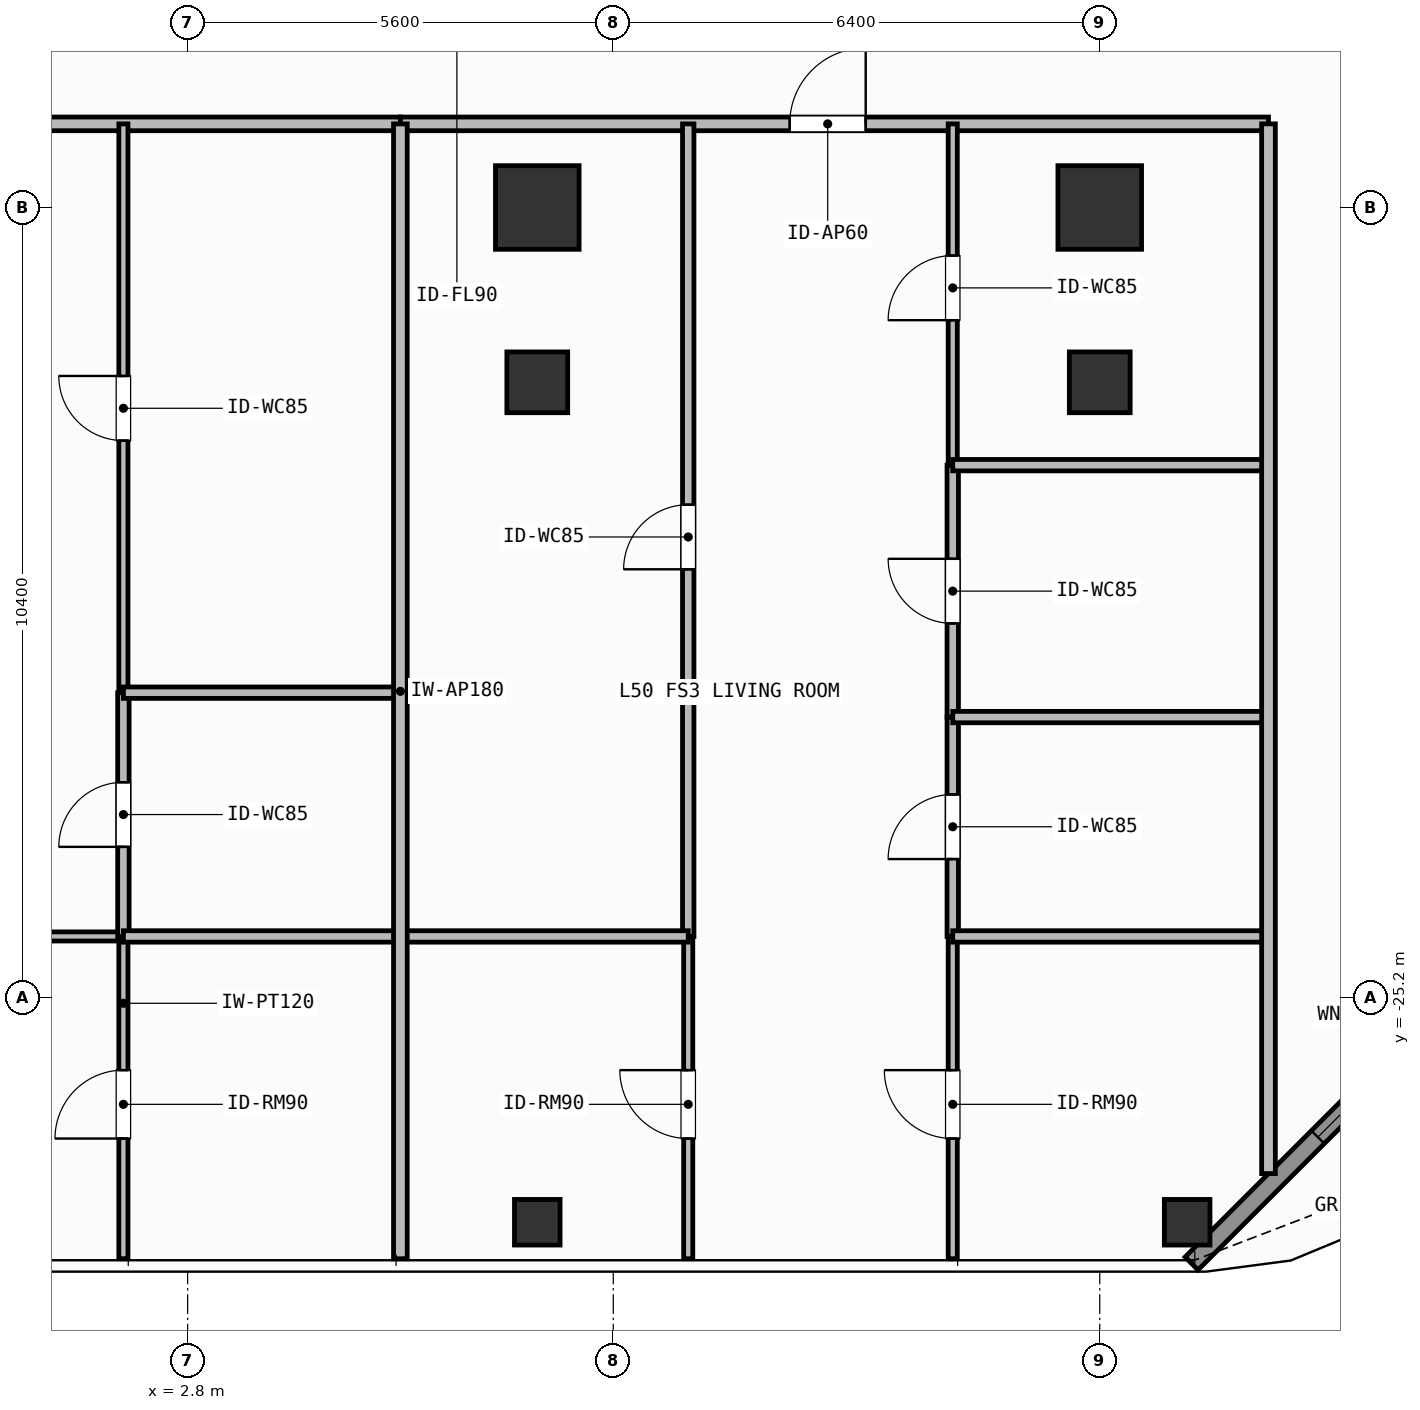
"""IFC4 building model, lengths in metres.
Left out: names, types, materials, properties, quantities, classifications, styles, units other than length and angle.
Written with IfcOpenShell. Run it as: python <this file> out.ifc"""

import sys

from ifc_helpers import new_model, si_unit, direction, frame, frame_2d, origin, origin_2d, place, context, subcontext, project, spatial, rectangle, hollow_rectangle, extrude, element, fill, save


model = new_model("IFC4")
c1 = context("Model", 3, precision=1e-05, world=origin(), true_north=direction((0.0, 1.0)))
c2 = subcontext(c1, "Body", "Model", "MODEL_VIEW")
j1 = project(units=[si_unit("LENGTHUNIT", "METRE"), si_unit("PLANEANGLEUNIT", "RADIAN")], contexts=[c1])
p1 = place(None, origin())
s1 = spatial("IfcSite", under=j1, at=p1, CompositionType="ELEMENT")
p2 = place(p1, origin())
s2 = spatial("IfcBuilding", under=s1, at=p2, CompositionType="ELEMENT")
p3 = place(p2, frame((0.0, 0.0, 203.1)))
s3 = spatial("IfcBuildingStorey", under=s2, at=p3, CompositionType="ELEMENT", Elevation=203.1)
for number, where, z_axis, x_axis in (
    (1, (7.4, -14.8, 0.0), (0.0, 0.0, 1.0), (1.0, 0.0, 0.0)),
    (2, (14.8, -14.8, 0.0), (0.0, 0.0, 1.0), (1.0, 0.0, 0.0)),
):
    element("IfcColumn", number, at=place(p3, frame(where, z_axis=z_axis, x_axis=x_axis)), inside=s3, PredefinedType="COLUMN", context=c2, shape_type="SweptSolid", body=[
        extrude(rectangle(XDim=1.1, YDim=1.1, at=origin_2d()), origin(), (0.0, 0.0, 1.0), 3.9),
    ])
for number, where, z_axis, x_axis in (
    (3, (7.4, -17.1, 0.0), (0.0, 0.0, 1.0), (1.0, 0.0, 0.0)),
    (4, (14.8, -17.1, 0.0), (0.0, 0.0, 1.0), (1.0, 0.0, 0.0)),
):
    element("IfcColumn", number, at=place(p3, frame(where, z_axis=z_axis, x_axis=x_axis)), inside=s3, PredefinedType="COLUMN", context=c2, shape_type="SweptSolid", body=[
        extrude(hollow_rectangle(XDim=0.8, YDim=0.8, WallThickness=0.036, at=origin_2d()), origin(), (0.0, 0.0, 1.0), 3.9),
    ])
for number, where, z_axis, x_axis in (
    (5, (15.95, -28.15, 0.0), (0.0, 0.0, 1.0), (1.0, 0.0, 0.0)),
    (6, (7.4, -28.15, 0.0), (0.0, 0.0, 1.0), (1.0, 0.0, 0.0)),
):
    element("IfcColumn", number, at=place(p3, frame(where, z_axis=z_axis, x_axis=x_axis)), inside=s3, PredefinedType="COLUMN", context=c2, shape_type="SweptSolid", body=[
        extrude(hollow_rectangle(XDim=0.6, YDim=0.6, WallThickness=0.028, at=origin_2d()), origin(), (0.0, 0.0, 1.0), 3.9),
    ])
p4 = place(p3, frame((20.392, -24.308, 0.0), z_axis=(0.0, 0.0, 1.0), x_axis=(-0.707106781187, -0.707106781187, 0.0)))
e7 = element("IfcWall", 7, at=p4, inside=s3, PredefinedType="SOLIDWALL", context=c2, shape_type="SweptSolid", body=[
    extrude(rectangle(XDim=6.201, YDim=0.24, at=frame_2d((3.101, 0.0))), origin(), (0.0, 0.0, 1.0), 3.68),
])
p5 = place(p4, frame((2.351, 0.0, 0.8)))
e8 = element("IfcOpeningElement", 8, at=p5, cuts=e7, PredefinedType="OPENING", context=c2, shape_type="SweptSolid", body=[
    extrude(rectangle(XDim=1.5, YDim=1.85, at=frame_2d((0.75, 0.925))), frame((0.0, 0.13, 0.0), z_axis=(0.0, -1.0, 0.0), x_axis=(1.0, 0.0, 0.0)), (0.0, 0.0, 1.0), 0.26),
])
p6 = place(p3, frame((-10.855, -13.7, 0.0), z_axis=(0.0, 0.0, 1.0), x_axis=(1.0, 0.0, 0.0)))
e9 = element("IfcWall", 9, at=p6, inside=s3, PredefinedType="PARTITIONING", context=c2, shape_type="SweptSolid", body=[
    extrude(rectangle(XDim=16.454, YDim=0.18, at=frame_2d((8.227, 0.0))), origin(), (0.0, 0.0, 1.0), 3.68),
])
p7 = place(p6, frame((8.528, 0.0, 0.0)))
e10 = element("IfcOpeningElement", 10, at=p7, cuts=e9, PredefinedType="OPENING", context=c2, shape_type="SweptSolid", body=[
    extrude(rectangle(XDim=1.0, YDim=2.2, at=frame_2d((0.5, 1.1))), frame((0.0, 0.1, 0.0), z_axis=(0.0, -1.0, 0.0), x_axis=(1.0, 0.0, 0.0)), (0.0, 0.0, 1.0), 0.2),
])
p8 = place(p3, frame((-5.293, -24.39, 0.0), z_axis=(0.0, 0.0, 1.0), x_axis=(1.0, 0.0, 0.0)))
e11 = element("IfcWall", 11, at=p8, inside=s3, PredefinedType="PARTITIONING", context=c2, shape_type="SweptSolid", body=[
    extrude(rectangle(XDim=7.248, YDim=0.12, at=frame_2d((3.624, 0.0))), origin(), (0.0, 0.0, 1.0), 3.68),
])
p9 = place(p8, frame((3.174, 0.0, 0.0)))
e12 = element("IfcOpeningElement", 12, at=p9, cuts=e11, PredefinedType="OPENING", context=c2, shape_type="SweptSolid", body=[
    extrude(rectangle(XDim=0.9, YDim=2.1, at=frame_2d((0.45, 1.05))), frame((0.0, 0.07, 0.0), z_axis=(0.0, -1.0, 0.0), x_axis=(1.0, 0.0, 0.0)), (0.0, 0.0, 1.0), 0.14),
])
p10 = place(p3, frame((1.955, -24.39, 0.0), z_axis=(0.0, 0.0, 1.0), x_axis=(0.0, 1.0, 0.0)))
e13 = element("IfcWall", 13, at=p10, inside=s3, PredefinedType="PARTITIONING", context=c2, shape_type="SweptSolid", body=[
    extrude(rectangle(XDim=3.207, YDim=0.15, at=frame_2d((1.604, 0.0))), origin(), (0.0, 0.0, 1.0), 3.68),
])
p11 = place(p10, frame((1.178, 0.0, 0.0)))
e14 = element("IfcOpeningElement", 14, at=p11, cuts=e13, PredefinedType="OPENING", context=c2, shape_type="SweptSolid", body=[
    extrude(rectangle(XDim=0.85, YDim=2.1, at=frame_2d((0.425, 1.05))), frame((0.0, 0.085, 0.0), z_axis=(0.0, -1.0, 0.0), x_axis=(1.0, 0.0, 0.0)), (0.0, 0.0, 1.0), 0.17),
])
p12 = place(p3, frame((1.955, -21.183, 0.0), z_axis=(0.0, 0.0, 1.0), x_axis=(0.0, 1.0, 0.0)))
e15 = element("IfcWall", 15, at=p12, inside=s3, PredefinedType="PARTITIONING", context=c2, shape_type="SweptSolid", body=[
    extrude(rectangle(XDim=7.483, YDim=0.12, at=frame_2d((3.742, 0.0))), origin(), (0.0, 0.0, 1.0), 3.68),
])
p13 = place(p12, frame((3.316, 0.0, 0.0)))
e16 = element("IfcOpeningElement", 16, at=p13, cuts=e15, PredefinedType="OPENING", context=c2, shape_type="SweptSolid", body=[
    extrude(rectangle(XDim=0.85, YDim=2.1, at=frame_2d((0.425, 1.05))), frame((0.0, 0.07, 0.0), z_axis=(0.0, -1.0, 0.0), x_axis=(1.0, 0.0, 0.0)), (0.0, 0.0, 1.0), 0.14),
])
p14 = place(p3, frame((1.955, -28.63, 0.0), z_axis=(0.0, 0.0, 1.0), x_axis=(0.0, 1.0, 0.0)))
e17 = element("IfcWall", 17, at=p14, inside=s3, PredefinedType="PARTITIONING", context=c2, shape_type="SweptSolid", body=[
    extrude(rectangle(XDim=4.24, YDim=0.12, at=frame_2d((2.12, 0.0))), origin(), (0.0, 0.0, 1.0), 3.68),
])
p15 = place(p14, frame((1.581, 0.0, 0.0)))
e18 = element("IfcOpeningElement", 18, at=p15, cuts=e17, PredefinedType="OPENING", context=c2, shape_type="SweptSolid", body=[
    extrude(rectangle(XDim=0.9, YDim=2.1, at=frame_2d((0.45, 1.05))), frame((0.0, 0.07, 0.0), z_axis=(0.0, -1.0, 0.0), x_axis=(1.0, 0.0, 0.0)), (0.0, 0.0, 1.0), 0.14),
])
p16 = place(p3, frame((5.599, -13.7, 0.0), z_axis=(0.0, 0.0, 1.0), x_axis=(1.0, 0.0, 0.0)))
e19 = element("IfcWall", 19, at=p16, inside=s3, PredefinedType="PARTITIONING", context=c2, shape_type="SweptSolid", body=[
    extrude(rectangle(XDim=11.421, YDim=0.18, at=frame_2d((5.71, 0.0))), origin(), (0.0, 0.0, 1.0), 3.68),
])
p17 = place(p16, frame((5.122, 0.0, 0.0)))
e20 = element("IfcOpeningElement", 20, at=p17, cuts=e19, PredefinedType="OPENING", context=c2, shape_type="SweptSolid", body=[
    extrude(rectangle(XDim=1.0, YDim=2.2, at=frame_2d((0.5, 1.1))), frame((0.0, 0.1, 0.0), z_axis=(0.0, -1.0, 0.0), x_axis=(1.0, 0.0, 0.0)), (0.0, 0.0, 1.0), 0.2),
])
p18 = place(p3, frame((9.386, -24.39, 0.0), z_axis=(0.0, 0.0, 1.0), x_axis=(0.0, 1.0, 0.0)))
e21 = element("IfcWall", 21, at=p18, inside=s3, PredefinedType="PARTITIONING", context=c2, shape_type="SweptSolid", body=[
    extrude(rectangle(XDim=10.69, YDim=0.15, at=frame_2d((5.345, 0.0))), origin(), (0.0, 0.0, 1.0), 3.68),
])
p19 = place(p18, frame((4.83, 0.0, 0.0)))
e22 = element("IfcOpeningElement", 22, at=p19, cuts=e21, PredefinedType="OPENING", context=c2, shape_type="SweptSolid", body=[
    extrude(rectangle(XDim=0.85, YDim=2.1, at=frame_2d((0.425, 1.05))), frame((0.0, 0.085, 0.0), z_axis=(0.0, -1.0, 0.0), x_axis=(1.0, 0.0, 0.0)), (0.0, 0.0, 1.0), 0.17),
])
p20 = place(p3, frame((9.386, -28.63, 0.0), z_axis=(0.0, 0.0, 1.0), x_axis=(0.0, 1.0, 0.0)))
e23 = element("IfcWall", 23, at=p20, inside=s3, PredefinedType="PARTITIONING", context=c2, shape_type="SweptSolid", body=[
    extrude(rectangle(XDim=4.24, YDim=0.12, at=frame_2d((2.12, 0.0))), origin(), (0.0, 0.0, 1.0), 3.68),
])
p21 = place(p20, frame((1.581, 0.0, 0.0)))
e24 = element("IfcOpeningElement", 24, at=p21, cuts=e23, PredefinedType="OPENING", context=c2, shape_type="SweptSolid", body=[
    extrude(rectangle(XDim=0.9, YDim=2.1, at=frame_2d((0.45, 1.05))), frame((0.0, 0.07, 0.0), z_axis=(0.0, -1.0, 0.0), x_axis=(1.0, 0.0, 0.0)), (0.0, 0.0, 1.0), 0.14),
])
p22 = place(p3, frame((12.866, -24.39, 0.0), z_axis=(0.0, 0.0, 1.0), x_axis=(0.0, 1.0, 0.0)))
e25 = element("IfcWall", 25, at=p22, inside=s3, PredefinedType="PARTITIONING", context=c2, shape_type="SweptSolid", body=[
    extrude(rectangle(XDim=2.886, YDim=0.15, at=frame_2d((1.443, 0.0))), origin(), (0.0, 0.0, 1.0), 3.68),
])
p23 = place(p22, frame((1.018, 0.0, 0.0)))
e26 = element("IfcOpeningElement", 26, at=p23, cuts=e25, PredefinedType="OPENING", context=c2, shape_type="SweptSolid", body=[
    extrude(rectangle(XDim=0.85, YDim=2.1, at=frame_2d((0.425, 1.05))), frame((0.0, 0.085, 0.0), z_axis=(0.0, -1.0, 0.0), x_axis=(1.0, 0.0, 0.0)), (0.0, 0.0, 1.0), 0.17),
])
p24 = place(p3, frame((12.866, -21.504, 0.0), z_axis=(0.0, 0.0, 1.0), x_axis=(0.0, 1.0, 0.0)))
e27 = element("IfcWall", 27, at=p24, inside=s3, PredefinedType="PARTITIONING", context=c2, shape_type="SweptSolid", body=[
    extrude(rectangle(XDim=3.314, YDim=0.15, at=frame_2d((1.657, 0.0))), origin(), (0.0, 0.0, 1.0), 3.68),
])
p25 = place(p24, frame((1.232, 0.0, 0.0)))
e28 = element("IfcOpeningElement", 28, at=p25, cuts=e27, PredefinedType="OPENING", context=c2, shape_type="SweptSolid", body=[
    extrude(rectangle(XDim=0.85, YDim=2.1, at=frame_2d((0.425, 1.05))), frame((0.0, 0.085, 0.0), z_axis=(0.0, -1.0, 0.0), x_axis=(1.0, 0.0, 0.0)), (0.0, 0.0, 1.0), 0.17),
])
p26 = place(p3, frame((12.866, -18.19, 0.0), z_axis=(0.0, 0.0, 1.0), x_axis=(0.0, 1.0, 0.0)))
e29 = element("IfcWall", 29, at=p26, inside=s3, PredefinedType="PARTITIONING", context=c2, shape_type="SweptSolid", body=[
    extrude(rectangle(XDim=4.49, YDim=0.12, at=frame_2d((2.245, 0.0))), origin(), (0.0, 0.0, 1.0), 3.68),
])
p27 = place(p26, frame((1.907, 0.0, 0.0)))
e30 = element("IfcOpeningElement", 30, at=p27, cuts=e29, PredefinedType="OPENING", context=c2, shape_type="SweptSolid", body=[
    extrude(rectangle(XDim=0.85, YDim=2.1, at=frame_2d((0.425, 1.05))), frame((0.0, 0.07, 0.0), z_axis=(0.0, -1.0, 0.0), x_axis=(1.0, 0.0, 0.0)), (0.0, 0.0, 1.0), 0.14),
])
p28 = place(p3, frame((12.866, -28.63, 0.0), z_axis=(0.0, 0.0, 1.0), x_axis=(0.0, 1.0, 0.0)))
e31 = element("IfcWall", 31, at=p28, inside=s3, PredefinedType="PARTITIONING", context=c2, shape_type="SweptSolid", body=[
    extrude(rectangle(XDim=4.24, YDim=0.12, at=frame_2d((2.12, 0.0))), origin(), (0.0, 0.0, 1.0), 3.68),
])
p29 = place(p28, frame((1.581, 0.0, 0.0)))
e32 = element("IfcOpeningElement", 32, at=p29, cuts=e31, PredefinedType="OPENING", context=c2, shape_type="SweptSolid", body=[
    extrude(rectangle(XDim=0.9, YDim=2.1, at=frame_2d((0.45, 1.05))), frame((0.0, 0.07, 0.0), z_axis=(0.0, -1.0, 0.0), x_axis=(1.0, 0.0, 0.0)), (0.0, 0.0, 1.0), 0.14),
])
for number, where, z_axis, x_axis in (
    (33, (1.955, -21.183, 0.0), (0.0, 0.0, 1.0), (1.0, 0.0, 0.0)),
    (34, (1.955, -24.39, 0.0), (0.0, 0.0, 1.0), (1.0, 0.0, 0.0)),
):
    element("IfcWall", number, at=place(p3, frame(where, z_axis=z_axis, x_axis=x_axis)), inside=s3, PredefinedType="PARTITIONING", context=c2, shape_type="SweptSolid", body=[
        extrude(rectangle(XDim=3.644, YDim=0.15, at=frame_2d((1.822, 0.0))), origin(), (0.0, 0.0, 1.0), 3.68),
    ])
p30 = place(p3, frame((5.599, -24.39, 0.0), z_axis=(0.0, 0.0, 1.0), x_axis=(1.0, 0.0, 0.0)))
e35 = element("IfcWall", 35, at=p30, inside=s3, PredefinedType="PARTITIONING", context=c2, shape_type="SweptSolid", body=[
    extrude(rectangle(XDim=3.787, YDim=0.15, at=frame_2d((1.894, 0.0))), origin(), (0.0, 0.0, 1.0), 3.68),
])
p31 = place(p3, frame((12.866, -21.504, 0.0), z_axis=(0.0, 0.0, 1.0), x_axis=(1.0, 0.0, 0.0)))
e36 = element("IfcWall", 36, at=p31, inside=s3, PredefinedType="PARTITIONING", context=c2, shape_type="SweptSolid", body=[
    extrude(rectangle(XDim=4.154, YDim=0.15, at=frame_2d((2.077, 0.0))), origin(), (0.0, 0.0, 1.0), 3.42),
])
for number, where, z_axis, x_axis in (
    (37, (12.866, -18.19, 0.0), (0.0, 0.0, 1.0), (1.0, 0.0, 0.0)),
    (38, (12.866, -24.39, 0.0), (0.0, 0.0, 1.0), (1.0, 0.0, 0.0)),
):
    element("IfcWall", number, at=place(p3, frame(where, z_axis=z_axis, x_axis=x_axis)), inside=s3, PredefinedType="PARTITIONING", context=c2, shape_type="SweptSolid", body=[
        extrude(rectangle(XDim=4.154, YDim=0.15, at=frame_2d((2.077, 0.0))), origin(), (0.0, 0.0, 1.0), 3.68),
    ])
p32 = place(p3, frame((5.599, -28.63, 0.0), z_axis=(0.0, 0.0, 1.0), x_axis=(0.0, 1.0, 0.0)))
e39 = element("IfcWall", 39, at=p32, inside=s3, PredefinedType="PARTITIONING", context=c2, shape_type="SweptSolid", body=[
    extrude(rectangle(XDim=14.93, YDim=0.18, at=frame_2d((7.465, 0.0))), origin(), (0.0, 0.0, 1.0), 3.68),
])
p33 = place(p3, frame((17.02, -27.51, 0.0), z_axis=(0.0, 0.0, 1.0), x_axis=(0.0, 1.0, 0.0)))
e40 = element("IfcWall", 40, at=p33, inside=s3, PredefinedType="PARTITIONING", context=c2, shape_type="SweptSolid", body=[
    extrude(rectangle(XDim=13.81, YDim=0.18, at=frame_2d((6.905, 0.0))), origin(), (0.0, 0.0, 1.0), 3.68),
])
p34 = place(p5, origin())
e41 = element("IfcWindow", 41, at=p34, inside=s3, PartitioningType="SINGLE_PANEL", PredefinedType="WINDOW", context=c2, shape_type="SweptSolid", body=[
    extrude(rectangle(XDim=1.5, YDim=1.85, at=frame_2d((0.75, 0.925))), frame((0.0, 0.03, 0.0), z_axis=(0.0, -1.0, 0.0), x_axis=(1.0, 0.0, 0.0)), (0.0, 0.0, 1.0), 0.06),
])
fill(e8, e41)
p35 = place(p11, origin())
e42 = element("IfcDoor", 42, at=p35, inside=s3, OperationType="SINGLE_SWING_LEFT", PredefinedType="DOOR", context=c2, shape_type="SweptSolid", body=[
    extrude(rectangle(XDim=0.85, YDim=2.1, at=frame_2d((0.425, 1.05))), frame((0.0, 0.025, 0.0), z_axis=(0.0, -1.0, 0.0), x_axis=(1.0, 0.0, 0.0)), (0.0, 0.0, 1.0), 0.05),
])
fill(e14, e42)
p36 = place(p13, origin())
e43 = element("IfcDoor", 43, at=p36, inside=s3, OperationType="SINGLE_SWING_RIGHT", PredefinedType="DOOR", context=c2, shape_type="SweptSolid", body=[
    extrude(rectangle(XDim=0.85, YDim=2.1, at=frame_2d((0.425, 1.05))), frame((0.0, 0.025, 0.0), z_axis=(0.0, -1.0, 0.0), x_axis=(1.0, 0.0, 0.0)), (0.0, 0.0, 1.0), 0.05),
])
fill(e16, e43)
p37 = place(p15, origin())
e44 = element("IfcDoor", 44, at=p37, inside=s3, OperationType="SINGLE_SWING_LEFT", PredefinedType="DOOR", context=c2, shape_type="SweptSolid", body=[
    extrude(rectangle(XDim=0.9, YDim=2.1, at=frame_2d((0.45, 1.05))), frame((0.0, 0.025, 0.0), z_axis=(0.0, -1.0, 0.0), x_axis=(1.0, 0.0, 0.0)), (0.0, 0.0, 1.0), 0.05),
])
fill(e18, e44)
p38 = place(p17, origin())
e45 = element("IfcDoor", 45, at=p38, inside=s3, OperationType="SINGLE_SWING_RIGHT", PredefinedType="DOOR", context=c2, shape_type="SweptSolid", body=[
    extrude(rectangle(XDim=1.0, YDim=2.2, at=frame_2d((0.5, 1.1))), frame((0.0, 0.025, 0.0), z_axis=(0.0, -1.0, 0.0), x_axis=(1.0, 0.0, 0.0)), (0.0, 0.0, 1.0), 0.05),
])
fill(e20, e45)
p39 = place(p19, origin())
e46 = element("IfcDoor", 46, at=p39, inside=s3, OperationType="SINGLE_SWING_LEFT", PredefinedType="DOOR", context=c2, shape_type="SweptSolid", body=[
    extrude(rectangle(XDim=0.85, YDim=2.1, at=frame_2d((0.425, 1.05))), frame((0.0, 0.025, 0.0), z_axis=(0.0, -1.0, 0.0), x_axis=(1.0, 0.0, 0.0)), (0.0, 0.0, 1.0), 0.05),
])
fill(e22, e46)
p40 = place(p21, origin())
e47 = element("IfcDoor", 47, at=p40, inside=s3, OperationType="SINGLE_SWING_RIGHT", PredefinedType="DOOR", context=c2, shape_type="SweptSolid", body=[
    extrude(rectangle(XDim=0.9, YDim=2.1, at=frame_2d((0.45, 1.05))), frame((0.0, 0.025, 0.0), z_axis=(0.0, -1.0, 0.0), x_axis=(1.0, 0.0, 0.0)), (0.0, 0.0, 1.0), 0.05),
])
fill(e24, e47)
p41 = place(p23, origin())
e48 = element("IfcDoor", 48, at=p41, inside=s3, OperationType="SINGLE_SWING_LEFT", PredefinedType="DOOR", context=c2, shape_type="SweptSolid", body=[
    extrude(rectangle(XDim=0.85, YDim=2.1, at=frame_2d((0.425, 1.05))), frame((0.0, 0.025, 0.0), z_axis=(0.0, -1.0, 0.0), x_axis=(1.0, 0.0, 0.0)), (0.0, 0.0, 1.0), 0.05),
])
fill(e26, e48)
p42 = place(p25, origin())
e49 = element("IfcDoor", 49, at=p42, inside=s3, OperationType="SINGLE_SWING_RIGHT", PredefinedType="DOOR", context=c2, shape_type="SweptSolid", body=[
    extrude(rectangle(XDim=0.85, YDim=2.1, at=frame_2d((0.425, 1.05))), frame((0.0, 0.025, 0.0), z_axis=(0.0, -1.0, 0.0), x_axis=(1.0, 0.0, 0.0)), (0.0, 0.0, 1.0), 0.05),
])
fill(e28, e49)
p43 = place(p27, origin())
e50 = element("IfcDoor", 50, at=p43, inside=s3, OperationType="SINGLE_SWING_LEFT", PredefinedType="DOOR", context=c2, shape_type="SweptSolid", body=[
    extrude(rectangle(XDim=0.85, YDim=2.1, at=frame_2d((0.425, 1.05))), frame((0.0, 0.025, 0.0), z_axis=(0.0, -1.0, 0.0), x_axis=(1.0, 0.0, 0.0)), (0.0, 0.0, 1.0), 0.05),
])
fill(e30, e50)
p44 = place(p29, origin())
e51 = element("IfcDoor", 51, at=p44, inside=s3, OperationType="SINGLE_SWING_RIGHT", PredefinedType="DOOR", context=c2, shape_type="SweptSolid", body=[
    extrude(rectangle(XDim=0.9, YDim=2.1, at=frame_2d((0.45, 1.05))), frame((0.0, 0.025, 0.0), z_axis=(0.0, -1.0, 0.0), x_axis=(1.0, 0.0, 0.0)), (0.0, 0.0, 1.0), 0.05),
])
fill(e32, e51)
save(model, sys.argv[1])
